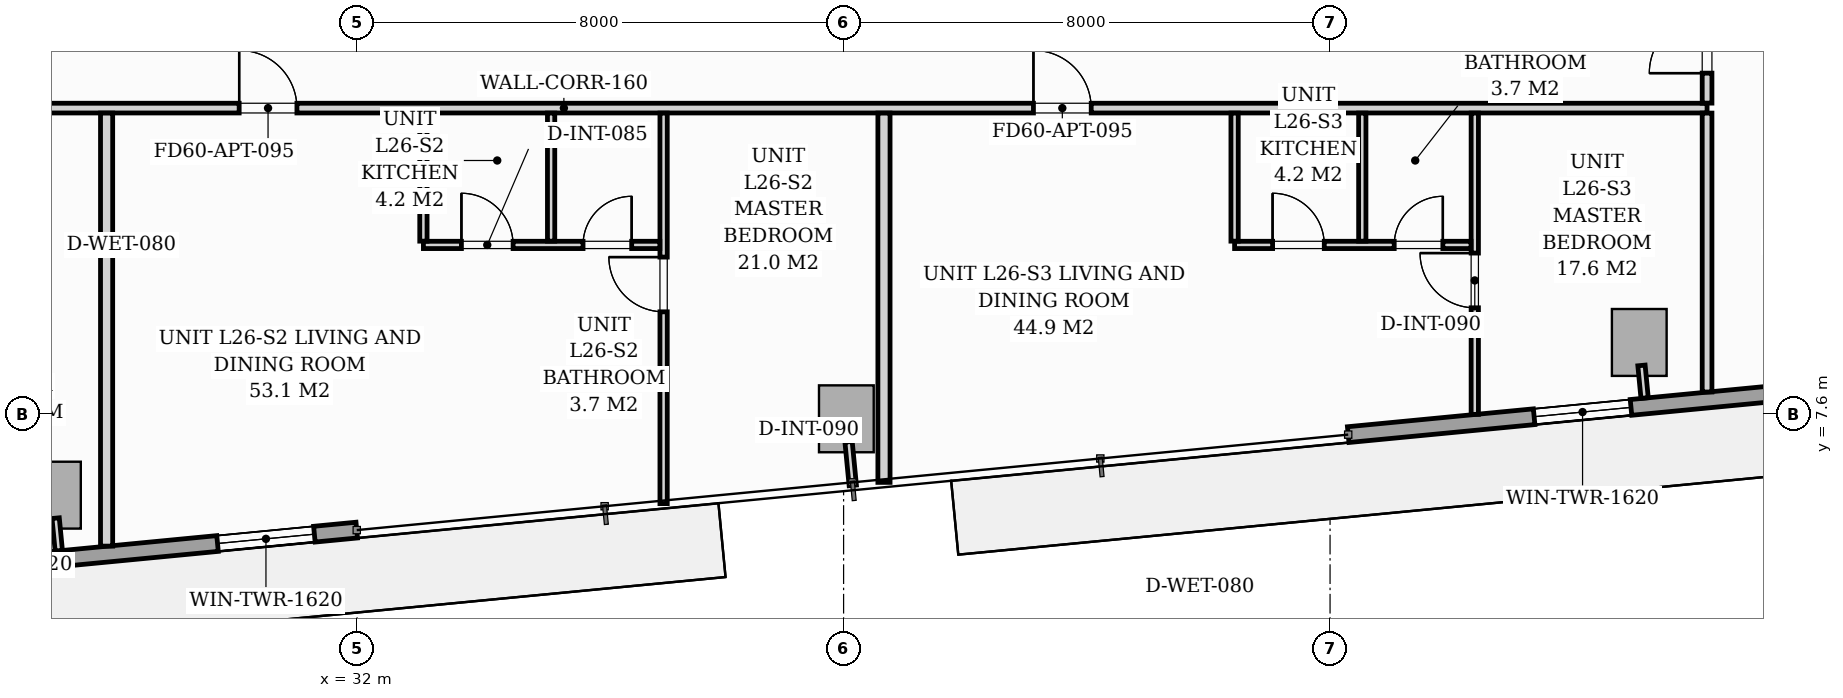
"""IFC4 building model, lengths in metres.
Left out: names, types, materials, properties, quantities, classifications, styles, units other than length and angle.
Written with IfcOpenShell. Run it as: python <this file> out.ifc"""

import sys

from ifc_helpers import new_model, si_unit, direction, frame, frame_2d, origin, origin_2d, place, context, subcontext, project, spatial, rectangle, extrude, source, transform, mapped, element, fill, save


model = new_model("IFC4")
c1 = context("Model", 3, precision=1e-05, world=origin(), true_north=direction((0.0, 1.0)))
c2 = subcontext(c1, "Body", "Model", "MODEL_VIEW")
j1 = project(units=[si_unit("LENGTHUNIT", "METRE"), si_unit("PLANEANGLEUNIT", "RADIAN")], contexts=[c1])
p1 = place(None, origin())
s1 = spatial("IfcSite", under=j1, at=p1, CompositionType="ELEMENT")
p2 = place(p1, origin())
s2 = spatial("IfcBuilding", under=s1, at=p2, CompositionType="ELEMENT")
p3 = place(p2, frame((0.0, 0.0, 93.8)))
s3 = spatial("IfcBuildingStorey", under=s2, at=p3, CompositionType="ELEMENT", Elevation=93.8)
m1 = source(origin(), c2, "Body", "SweptSolid", [
    extrude(rectangle(XDim=0.9, YDim=1.1, at=origin_2d()), origin(), (0.0, 0.0, 1.0), 3.196),
])
for number, where, z_axis, x_axis in (
    (1, (27.006, 6.265, 0.002), (0.0, 0.0, 1.0), (0.995, 0.096, 0.0)),
    (2, (40.045, 7.521, 0.002), (0.0, 0.0, 1.0), (0.995, 0.096, 0.0)),
    (3, (53.085, 8.776, 0.002), (0.0, 0.0, 1.0), (0.995, 0.096, 0.0)),
):
    element("IfcColumn", number, at=place(p3, frame(where, z_axis=z_axis, x_axis=x_axis)), inside=s3, PredefinedType="COLUMN", context=c2, shape_type="MappedRepresentation", body=[
        mapped(m1, transform((0.0, 0.0, 0.0), scale=1.0)),
    ])
p4 = place(p3, frame((67.32, 9.092, 0.0), z_axis=(0.0, 0.0, 1.0), x_axis=(-0.995396521236, -0.095842399342, 0.0)))
e4 = element("IfcWall", 4, at=p4, inside=s3, PredefinedType="STANDARD", context=c2, shape_type="SweptSolid", body=[
    extrude(rectangle(XDim=19.11, YDim=0.26, at=frame_2d((9.555, 0.0))), origin(), (0.0, 0.0, 1.0), 2.94),
])
p5 = place(p4, frame((9.067, 0.0, 0.0)))
e5 = element("IfcOpeningElement", 5, at=p5, cuts=e4, PredefinedType="OPENING", context=c2, shape_type="SweptSolid", body=[
    extrude(rectangle(XDim=1.8, YDim=2.06, at=frame_2d((0.9, 1.03))), frame((0.0, 0.14, 0.0), z_axis=(0.0, -1.0, 0.0), x_axis=(1.0, 0.0, 0.0)), (0.0, 0.0, 1.0), 0.28),
])
p6 = place(p4, frame((2.05, 0.0, 0.65)))
e6 = element("IfcOpeningElement", 6, at=p6, cuts=e4, PredefinedType="OPENING", context=c2, shape_type="SweptSolid", body=[
    extrude(rectangle(XDim=1.6, YDim=1.5, at=frame_2d((0.8, 0.75))), frame((0.0, 0.14, 0.0), z_axis=(0.0, -1.0, 0.0), x_axis=(1.0, 0.0, 0.0)), (0.0, 0.0, 1.0), 0.28),
])
p7 = place(p4, frame((14.438, 0.0, 0.75)))
e7 = element("IfcOpeningElement", 7, at=p7, cuts=e4, PredefinedType="OPENING", context=c2, shape_type="SweptSolid", body=[
    extrude(rectangle(XDim=1.6, YDim=1.5, at=frame_2d((0.8, 0.75))), frame((0.0, 0.14, 0.0), z_axis=(0.0, -1.0, 0.0), x_axis=(1.0, 0.0, 0.0)), (0.0, 0.0, 1.0), 0.28),
])
p8 = place(p3, frame((31.994, 5.69, 0.0), z_axis=(0.0, 0.0, 1.0), x_axis=(-0.995396521236, -0.095842399342, 0.0)))
e8 = element("IfcWall", 8, at=p8, inside=s3, PredefinedType="STANDARD", context=c2, shape_type="SweptSolid", body=[
    extrude(rectangle(XDim=19.11, YDim=0.26, at=frame_2d((9.555, 0.0))), origin(), (0.0, 0.0, 1.0), 2.94),
])
p9 = place(p8, frame((7.63, 0.0, 0.0)))
e9 = element("IfcOpeningElement", 9, at=p9, cuts=e8, PredefinedType="OPENING", context=c2, shape_type="SweptSolid", body=[
    extrude(rectangle(XDim=1.8, YDim=2.06, at=frame_2d((0.9, 1.03))), frame((0.0, 0.14, 0.0), z_axis=(0.0, -1.0, 0.0), x_axis=(1.0, 0.0, 0.0)), (0.0, 0.0, 1.0), 0.28),
])
p10 = place(p8, frame((0.7, 0.0, 0.65)))
e10 = element("IfcOpeningElement", 10, at=p10, cuts=e8, PredefinedType="OPENING", context=c2, shape_type="SweptSolid", body=[
    extrude(rectangle(XDim=1.6, YDim=1.5, at=frame_2d((0.8, 0.75))), frame((0.0, 0.14, 0.0), z_axis=(0.0, -1.0, 0.0), x_axis=(1.0, 0.0, 0.0)), (0.0, 0.0, 1.0), 0.28),
])
p11 = place(p8, frame((5.167, 0.0, 0.75)))
e11 = element("IfcOpeningElement", 11, at=p11, cuts=e8, PredefinedType="OPENING", context=c2, shape_type="SweptSolid", body=[
    extrude(rectangle(XDim=1.6, YDim=1.5, at=frame_2d((0.8, 0.75))), frame((0.0, 0.14, 0.0), z_axis=(0.0, -1.0, 0.0), x_axis=(1.0, 0.0, 0.0)), (0.0, 0.0, 1.0), 0.28),
])
p12 = place(p3, frame((16.6, 12.63, 0.0), z_axis=(0.0, 0.0, 1.0), x_axis=(1.0, 0.0, 0.0)))
e12 = element("IfcWall", 12, at=p12, inside=s3, PredefinedType="PARTITIONING", context=c2, shape_type="SweptSolid", body=[
    extrude(rectangle(XDim=37.6, YDim=0.16, at=frame_2d((18.8, 0.0))), origin(), (0.0, 0.0, 1.0), 2.94),
])
p13 = place(p12, frame((1.626, 0.0, 0.0)))
e13 = element("IfcOpeningElement", 13, at=p13, cuts=e12, PredefinedType="OPENING", context=c2, shape_type="SweptSolid", body=[
    extrude(rectangle(XDim=0.95, YDim=2.06, at=frame_2d((0.475, 1.03))), frame((0.0, 0.09, 0.0), z_axis=(0.0, -1.0, 0.0), x_axis=(1.0, 0.0, 0.0)), (0.0, 0.0, 1.0), 0.18),
])
p14 = place(p12, frame((13.46, 0.0, 0.0)))
e14 = element("IfcOpeningElement", 14, at=p14, cuts=e12, PredefinedType="OPENING", context=c2, shape_type="SweptSolid", body=[
    extrude(rectangle(XDim=0.95, YDim=2.06, at=frame_2d((0.475, 1.03))), frame((0.0, 0.09, 0.0), z_axis=(0.0, -1.0, 0.0), x_axis=(1.0, 0.0, 0.0)), (0.0, 0.0, 1.0), 0.18),
])
p15 = place(p12, frame((26.522, 0.0, 0.0)))
e15 = element("IfcOpeningElement", 15, at=p15, cuts=e12, PredefinedType="OPENING", context=c2, shape_type="SweptSolid", body=[
    extrude(rectangle(XDim=0.95, YDim=2.06, at=frame_2d((0.475, 1.03))), frame((0.0, 0.09, 0.0), z_axis=(0.0, -1.0, 0.0), x_axis=(1.0, 0.0, 0.0)), (0.0, 0.0, 1.0), 0.18),
])
p16 = place(p3, frame((54.2, 7.961, 0.0), z_axis=(0.0, 0.0, 1.0), x_axis=(0.0, 1.0, 0.0)))
e16 = element("IfcWall", 16, at=p16, inside=s3, PredefinedType="PARTITIONING", context=c2, shape_type="SweptSolid", body=[
    extrude(rectangle(XDim=4.587, YDim=0.16, at=frame_2d((2.293, 0.0))), origin(), (0.0, 0.0, 1.0), 2.94),
])
p17 = place(p3, frame((54.2, 12.712, 0.0), z_axis=(0.0, 0.0, 1.0), x_axis=(0.0, 1.0, 0.0)))
e17 = element("IfcWall", 17, at=p17, inside=s3, PredefinedType="PARTITIONING", context=c2, shape_type="SweptSolid", body=[
    extrude(rectangle(XDim=14.815, YDim=0.16, at=frame_2d((7.408, 0.0))), origin(), (0.0, 0.0, 1.0), 2.94),
])
p18 = place(p17, frame((0.493, 0.0, 0.0)))
e18 = element("IfcOpeningElement", 18, at=p18, cuts=e17, PredefinedType="OPENING", context=c2, shape_type="SweptSolid", body=[
    extrude(rectangle(XDim=0.95, YDim=2.06, at=frame_2d((0.475, 1.03))), frame((0.0, 0.09, 0.0), z_axis=(0.0, -1.0, 0.0), x_axis=(1.0, 0.0, 0.0)), (0.0, 0.0, 1.0), 0.18),
])
p19 = place(p17, frame((5.433, 0.0, 0.0)))
e19 = element("IfcOpeningElement", 19, at=p19, cuts=e17, PredefinedType="OPENING", context=c2, shape_type="SweptSolid", body=[
    extrude(rectangle(XDim=0.85, YDim=2.0, at=frame_2d((0.425, 1.0))), frame((0.0, 0.09, 0.0), z_axis=(0.0, -1.0, 0.0), x_axis=(1.0, 0.0, 0.0)), (0.0, 0.0, 1.0), 0.18),
])
p20 = place(p3, frame((27.88, 5.427, 0.0), z_axis=(0.0, 0.0, 1.0), x_axis=(0.0, 1.0, 0.0)))
e20 = element("IfcWall", 20, at=p20, inside=s3, PredefinedType="PARTITIONING", context=c2, shape_type="SweptSolid", body=[
    extrude(rectangle(XDim=7.121, YDim=0.2, at=frame_2d((3.561, 0.0))), origin(), (0.0, 0.0, 1.0), 2.94),
])
p21 = place(p3, frame((37.04, 6.126, 0.0), z_axis=(0.0, 0.0, 1.0), x_axis=(0.0, 1.0, 0.0)))
e21 = element("IfcWall", 21, at=p21, inside=s3, PredefinedType="PARTITIONING", context=c2, shape_type="SweptSolid", body=[
    extrude(rectangle(XDim=6.422, YDim=0.12, at=frame_2d((3.211, 0.0))), origin(), (0.0, 0.0, 1.0), 2.94),
])
p22 = place(p21, frame((3.154, 0.0, 0.0)))
e22 = element("IfcOpeningElement", 22, at=p22, cuts=e21, PredefinedType="OPENING", context=c2, shape_type="SweptSolid", body=[
    extrude(rectangle(XDim=0.9, YDim=2.05, at=frame_2d((0.45, 1.025))), frame((0.0, 0.07, 0.0), z_axis=(0.0, -1.0, 0.0), x_axis=(1.0, 0.0, 0.0)), (0.0, 0.0, 1.0), 0.14),
])
p23 = place(p3, frame((33.09, 10.38, 0.0), z_axis=(0.0, 0.0, 1.0), x_axis=(1.0, 0.0, 0.0)))
e23 = element("IfcWall", 23, at=p23, inside=s3, PredefinedType="PARTITIONING", context=c2, shape_type="SweptSolid", body=[
    extrude(rectangle(XDim=3.888, YDim=0.12, at=frame_2d((1.944, 0.0))), origin(), (0.0, 0.0, 1.0), 2.94),
])
p24 = place(p23, frame((0.625, 0.0, 0.0)))
e24 = element("IfcOpeningElement", 24, at=p24, cuts=e23, PredefinedType="OPENING", context=c2, shape_type="SweptSolid", body=[
    extrude(rectangle(XDim=0.85, YDim=2.05, at=frame_2d((0.425, 1.025))), frame((0.0, 0.07, 0.0), z_axis=(0.0, -1.0, 0.0), x_axis=(1.0, 0.0, 0.0)), (0.0, 0.0, 1.0), 0.14),
])
p25 = place(p23, frame((2.625, 0.0, 0.0)))
e25 = element("IfcOpeningElement", 25, at=p25, cuts=e23, PredefinedType="OPENING", context=c2, shape_type="SweptSolid", body=[
    extrude(rectangle(XDim=0.8, YDim=2.02, at=frame_2d((0.4, 1.01))), frame((0.0, 0.07, 0.0), z_axis=(0.0, -1.0, 0.0), x_axis=(1.0, 0.0, 0.0)), (0.0, 0.0, 1.0), 0.14),
])
for number, where, z_axis, x_axis in (
    (26, (35.19, 10.442, 0.0), (0.0, 0.0, 1.0), (0.0, 1.0, 0.0)),
    (27, (33.09, 10.442, 0.0), (0.0, 0.0, 1.0), (0.0, 1.0, 0.0)),
):
    element("IfcWall", number, at=place(p3, frame(where, z_axis=z_axis, x_axis=x_axis)), inside=s3, PredefinedType="PARTITIONING", context=c2, shape_type="SweptSolid", body=[
        extrude(rectangle(XDim=2.106, YDim=0.12, at=frame_2d((1.053, 0.0))), origin(), (0.0, 0.0, 1.0), 2.94),
    ])
p26 = place(p3, frame((40.664, 6.475, 0.0), z_axis=(0.0, 0.0, 1.0), x_axis=(0.0, 1.0, 0.0)))
e28 = element("IfcWall", 28, at=p26, inside=s3, PredefinedType="PARTITIONING", context=c2, shape_type="SweptSolid", body=[
    extrude(rectangle(XDim=6.073, YDim=0.2, at=frame_2d((3.037, 0.0))), origin(), (0.0, 0.0, 1.0), 2.94),
])
p27 = place(p3, frame((50.38, 7.594, 0.0), z_axis=(0.0, 0.0, 1.0), x_axis=(0.0, 1.0, 0.0)))
e29 = element("IfcWall", 29, at=p27, inside=s3, PredefinedType="PARTITIONING", context=c2, shape_type="SweptSolid", body=[
    extrude(rectangle(XDim=4.955, YDim=0.12, at=frame_2d((2.477, 0.0))), origin(), (0.0, 0.0, 1.0), 2.94),
])
p28 = place(p27, frame((1.752, 0.0, 0.0)))
e30 = element("IfcOpeningElement", 30, at=p28, cuts=e29, PredefinedType="OPENING", context=c2, shape_type="SweptSolid", body=[
    extrude(rectangle(XDim=0.9, YDim=2.05, at=frame_2d((0.45, 1.025))), frame((0.0, 0.07, 0.0), z_axis=(0.0, -1.0, 0.0), x_axis=(1.0, 0.0, 0.0)), (0.0, 0.0, 1.0), 0.14),
])
p29 = place(p3, frame((46.43, 10.38, 0.0), z_axis=(0.0, 0.0, 1.0), x_axis=(1.0, 0.0, 0.0)))
e31 = element("IfcWall", 31, at=p29, inside=s3, PredefinedType="PARTITIONING", context=c2, shape_type="SweptSolid", body=[
    extrude(rectangle(XDim=3.888, YDim=0.12, at=frame_2d((1.944, 0.0))), origin(), (0.0, 0.0, 1.0), 2.94),
])
p30 = place(p29, frame((0.625, 0.0, 0.0)))
e32 = element("IfcOpeningElement", 32, at=p30, cuts=e31, PredefinedType="OPENING", context=c2, shape_type="SweptSolid", body=[
    extrude(rectangle(XDim=0.85, YDim=2.05, at=frame_2d((0.425, 1.025))), frame((0.0, 0.07, 0.0), z_axis=(0.0, -1.0, 0.0), x_axis=(1.0, 0.0, 0.0)), (0.0, 0.0, 1.0), 0.14),
])
p31 = place(p29, frame((2.625, 0.0, 0.0)))
e33 = element("IfcOpeningElement", 33, at=p31, cuts=e31, PredefinedType="OPENING", context=c2, shape_type="SweptSolid", body=[
    extrude(rectangle(XDim=0.8, YDim=2.02, at=frame_2d((0.4, 1.01))), frame((0.0, 0.07, 0.0), z_axis=(0.0, -1.0, 0.0), x_axis=(1.0, 0.0, 0.0)), (0.0, 0.0, 1.0), 0.14),
])
for number, where, z_axis, x_axis in (
    (34, (48.53, 10.442, 0.0), (0.0, 0.0, 1.0), (0.0, 1.0, 0.0)),
    (35, (46.43, 10.442, 0.0), (0.0, 0.0, 1.0), (0.0, 1.0, 0.0)),
):
    element("IfcWall", number, at=place(p3, frame(where, z_axis=z_axis, x_axis=x_axis)), inside=s3, PredefinedType="PARTITIONING", context=c2, shape_type="SweptSolid", body=[
        extrude(rectangle(XDim=2.106, YDim=0.12, at=frame_2d((1.053, 0.0))), origin(), (0.0, 0.0, 1.0), 2.94),
    ])
p32 = place(p3, frame((27.042, 5.887, 0.0), z_axis=(0.0, 0.0, 1.0), x_axis=(0.096222656154, -0.995359834654, 0.0)))
e36 = element("IfcWall", 36, at=p32, inside=s3, PredefinedType="PARTITIONING", context=c2, shape_type="SweptSolid", body=[
    extrude(rectangle(XDim=0.538, YDim=0.12, at=frame_2d((0.269, 0.0))), origin(), (0.0, 0.0, 1.0), 2.94),
])
p33 = place(p3, frame((40.082, 7.142, 0.0), z_axis=(0.0, 0.0, 1.0), x_axis=(0.095944965663, -0.995386640238, 0.0)))
e37 = element("IfcWall", 37, at=p33, inside=s3, PredefinedType="PARTITIONING", context=c2, shape_type="SweptSolid", body=[
    extrude(rectangle(XDim=0.72, YDim=0.12, at=frame_2d((0.36, 0.0))), origin(), (0.0, 0.0, 1.0), 2.94),
])
p34 = place(p3, frame((53.121, 8.398, 0.0), z_axis=(0.0, 0.0, 1.0), x_axis=(0.096179204763, -0.995364034196, 0.0)))
e38 = element("IfcWall", 38, at=p34, inside=s3, PredefinedType="PARTITIONING", context=c2, shape_type="SweptSolid", body=[
    extrude(rectangle(XDim=0.538, YDim=0.12, at=frame_2d((0.269, 0.0))), origin(), (0.0, 0.0, 1.0), 2.94),
])
m2 = source(origin(), c2, "Body", "SweptSolid", [
    extrude(rectangle(XDim=1.6, YDim=1.5, at=frame_2d((0.8, 0.75))), frame((0.0, 0.03, 0.0), z_axis=(0.0, -1.0, 0.0), x_axis=(1.0, 0.0, 0.0)), (0.0, 0.0, 1.0), 0.06),
])
p35 = place(p10, origin())
e39 = element("IfcWindow", 39, at=p35, inside=s3, PartitioningType="SINGLE_PANEL", PredefinedType="WINDOW", context=c2, shape_type="MappedRepresentation", body=[
    mapped(m2, transform((0.0, 0.0, 0.0), scale=1.0)),
])
fill(e10, e39)
p36 = place(p7, origin())
e40 = element("IfcWindow", 40, at=p36, inside=s3, PartitioningType="SINGLE_PANEL", PredefinedType="WINDOW", context=c2, shape_type="MappedRepresentation", body=[
    mapped(m2, transform((0.0, 0.0, 0.0), scale=1.0)),
])
fill(e7, e40)
m3 = source(origin(), c2, "Body", "SweptSolid", [
    extrude(rectangle(XDim=0.95, YDim=2.06, at=frame_2d((0.475, 1.03))), frame((0.0, 0.025, 0.0), z_axis=(0.0, -1.0, 0.0), x_axis=(1.0, 0.0, 0.0)), (0.0, 0.0, 1.0), 0.05),
])
p37 = place(p14, origin())
e41 = element("IfcDoor", 41, at=p37, inside=s3, OperationType="SINGLE_SWING_LEFT", PredefinedType="DOOR", context=c2, shape_type="MappedRepresentation", body=[
    mapped(m3, transform((0.0, 0.0, 0.0), scale=1.0)),
])
fill(e14, e41)
m4 = source(origin(), c2, "Body", "SweptSolid", [
    extrude(rectangle(XDim=0.9, YDim=2.05, at=frame_2d((0.45, 1.025))), frame((0.0, 0.025, 0.0), z_axis=(0.0, -1.0, 0.0), x_axis=(1.0, 0.0, 0.0)), (0.0, 0.0, 1.0), 0.05),
])
p38 = place(p22, origin())
e42 = element("IfcDoor", 42, at=p38, inside=s3, OperationType="SINGLE_SWING_RIGHT", PredefinedType="DOOR", context=c2, shape_type="MappedRepresentation", body=[
    mapped(m4, transform((0.0, 0.0, 0.0), scale=1.0)),
])
fill(e22, e42)
m5 = source(origin(), c2, "Body", "SweptSolid", [
    extrude(rectangle(XDim=0.85, YDim=2.05, at=frame_2d((0.425, 1.025))), frame((0.0, 0.025, 0.0), z_axis=(0.0, -1.0, 0.0), x_axis=(1.0, 0.0, 0.0)), (0.0, 0.0, 1.0), 0.05),
])
p39 = place(p24, origin())
e43 = element("IfcDoor", 43, at=p39, inside=s3, OperationType="SINGLE_SWING_LEFT", PredefinedType="DOOR", context=c2, shape_type="MappedRepresentation", body=[
    mapped(m5, transform((0.0, 0.0, 0.0), scale=1.0)),
])
fill(e24, e43)
m6 = source(origin(), c2, "Body", "SweptSolid", [
    extrude(rectangle(XDim=0.8, YDim=2.02, at=frame_2d((0.4, 1.01))), frame((0.0, 0.025, 0.0), z_axis=(0.0, -1.0, 0.0), x_axis=(1.0, 0.0, 0.0)), (0.0, 0.0, 1.0), 0.05),
])
p40 = place(p25, origin())
e44 = element("IfcDoor", 44, at=p40, inside=s3, OperationType="SINGLE_SWING_RIGHT", PredefinedType="DOOR", context=c2, shape_type="MappedRepresentation", body=[
    mapped(m6, transform((0.0, 0.0, 0.0), scale=1.0)),
])
fill(e25, e44)
p41 = place(p15, origin())
e45 = element("IfcDoor", 45, at=p41, inside=s3, OperationType="SINGLE_SWING_LEFT", PredefinedType="DOOR", context=c2, shape_type="MappedRepresentation", body=[
    mapped(m3, transform((0.0, 0.0, 0.0), scale=1.0)),
])
fill(e15, e45)
p42 = place(p28, origin())
e46 = element("IfcDoor", 46, at=p42, inside=s3, OperationType="SINGLE_SWING_RIGHT", PredefinedType="DOOR", context=c2, shape_type="MappedRepresentation", body=[
    mapped(m4, transform((0.0, 0.0, 0.0), scale=1.0)),
])
fill(e30, e46)
p43 = place(p30, origin())
e47 = element("IfcDoor", 47, at=p43, inside=s3, OperationType="SINGLE_SWING_LEFT", PredefinedType="DOOR", context=c2, shape_type="MappedRepresentation", body=[
    mapped(m5, transform((0.0, 0.0, 0.0), scale=1.0)),
])
fill(e32, e47)
p44 = place(p31, origin())
e48 = element("IfcDoor", 48, at=p44, inside=s3, OperationType="SINGLE_SWING_RIGHT", PredefinedType="DOOR", context=c2, shape_type="MappedRepresentation", body=[
    mapped(m6, transform((0.0, 0.0, 0.0), scale=1.0)),
])
fill(e33, e48)
p45 = place(p18, origin())
e49 = element("IfcDoor", 49, at=p45, inside=s3, OperationType="SINGLE_SWING_LEFT", PredefinedType="DOOR", context=c2, shape_type="MappedRepresentation", body=[
    mapped(m3, transform((0.0, 0.0, 0.0), scale=1.0)),
])
fill(e18, e49)
save(model, sys.argv[1])
